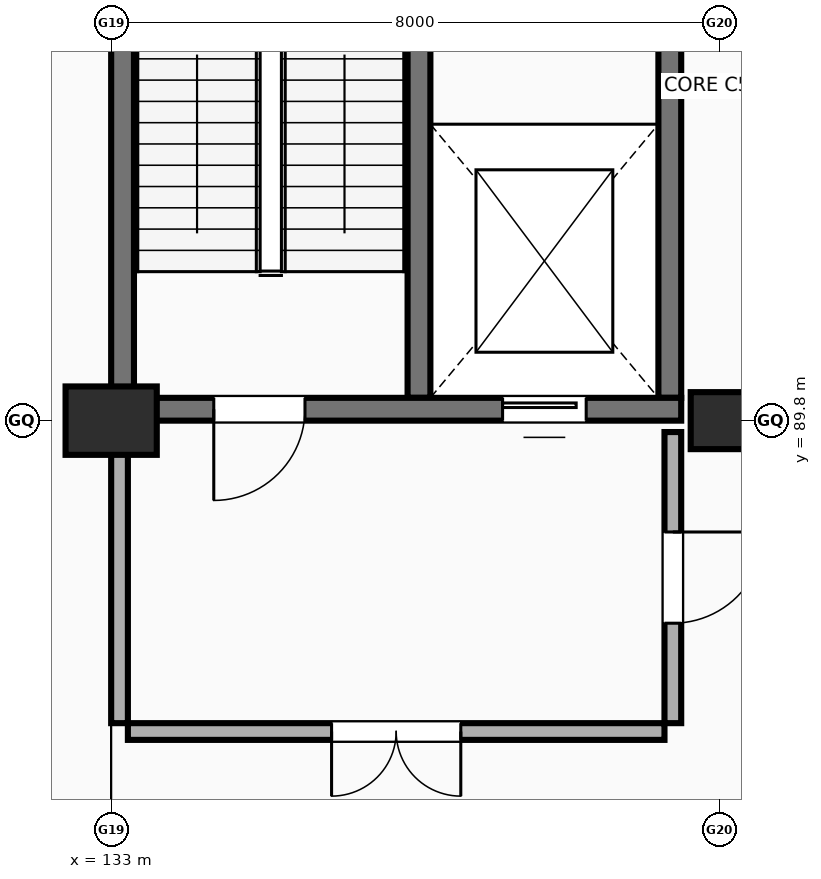
"""IFC4 building model, lengths in metres.
Left out: names, types, materials, properties, quantities, classifications, styles, units other than length and angle.
Written with IfcOpenShell. Run it as: python <this file> out.ifc"""

import sys

from ifc_helpers import new_model, si_unit, direction, frame, frame_2d, origin, origin_2d, place, context, subcontext, project, spatial, rectangle, extrude, element, fill, save


model = new_model("IFC4")
c1 = context("Model", 3, precision=1e-05, world=origin(), true_north=direction((0.0, 1.0)))
c2 = subcontext(c1, "Body", "Model", "MODEL_VIEW")
j1 = project(units=[si_unit("LENGTHUNIT", "METRE"), si_unit("PLANEANGLEUNIT", "RADIAN")], contexts=[c1])
p1 = place(None, origin())
s1 = spatial("IfcSite", under=j1, at=p1, CompositionType="ELEMENT")
p2 = place(p1, origin())
s2 = spatial("IfcBuilding", under=s1, at=p2, CompositionType="ELEMENT")
p3 = place(p2, frame((0.0, 0.0, 5.4)))
s3 = spatial("IfcBuildingStorey", under=s2, at=p3, CompositionType="ELEMENT", Elevation=5.4)
p4 = place(p3, frame((133.0, 89.8, 0.0), z_axis=(0.0, 0.0, 1.0), x_axis=(1.0, 0.0, 0.0)))
e1 = element("IfcColumn", 1, at=p4, inside=s3, PredefinedType="COLUMN", context=c2, shape_type="SweptSolid", body=[
    extrude(rectangle(XDim=1.2, YDim=0.9, at=origin_2d()), origin(), (0.0, 0.0, 1.0), 4.4),
])
p5 = place(p3, frame((141.0, 89.8, 0.0), z_axis=(0.0, 0.0, 1.0), x_axis=(1.0, 0.0, 0.0)))
e2 = element("IfcColumn", 2, at=p5, inside=s3, PredefinedType="COLUMN", context=c2, shape_type="SweptSolid", body=[
    extrude(rectangle(XDim=0.75, YDim=0.75, at=origin_2d()), origin(), (0.0, 0.0, 1.0), 4.4),
])
for number, where, z_axis, x_axis in (
    (3, (133.15, 90.1, 0.0), (0.0, 0.0, 1.0), (0.0, 1.0, 0.0)),
    (4, (140.35, 90.1, 0.0), (0.0, 0.0, 1.0), (0.0, 1.0, 0.0)),
    (5, (137.05, 90.1, 0.0), (0.0, 0.0, 1.0), (0.0, 1.0, 0.0)),
):
    element("IfcWall", number, at=place(p3, frame(where, z_axis=z_axis, x_axis=x_axis)), inside=s3, PredefinedType="SHEAR", context=c2, shape_type="SweptSolid", body=[
        extrude(rectangle(XDim=8.2, YDim=0.3, at=frame_2d((4.1, 0.0))), origin(), (0.0, 0.0, 1.0), 4.4),
    ])
p6 = place(p3, frame((133.0, 89.95, 0.0), z_axis=(0.0, 0.0, 1.0), x_axis=(1.0, 0.0, 0.0)))
e6 = element("IfcWall", 6, at=p6, inside=s3, PredefinedType="SHEAR", context=c2, shape_type="SweptSolid", body=[
    extrude(rectangle(XDim=7.5, YDim=0.3, at=frame_2d((3.75, 0.0))), origin(), (0.0, 0.0, 1.0), 4.4),
])
p7 = place(p6, frame((2.55, 0.0, 0.0), z_axis=(0.0, 0.0, 1.0), x_axis=(-1.0, 0.0, 0.0)))
e7 = element("IfcOpeningElement", 7, at=p7, cuts=e6, PredefinedType="OPENING", context=c2, shape_type="SweptSolid", body=[
    extrude(rectangle(XDim=1.2, YDim=2.15, at=frame_2d((0.6, 1.075))), frame((0.0, 0.16, 0.0), z_axis=(0.0, -1.0, 0.0), x_axis=(1.0, 0.0, 0.0)), (0.0, 0.0, 1.0), 0.32),
])
p8 = place(p6, frame((5.15, 0.0, 0.0)))
e8 = element("IfcOpeningElement", 8, at=p8, cuts=e6, PredefinedType="OPENING", context=c2, shape_type="SweptSolid", body=[
    extrude(rectangle(XDim=1.1, YDim=2.15, at=frame_2d((0.55, 1.075))), frame((0.0, 0.16, 0.0), z_axis=(0.0, -1.0, 0.0), x_axis=(1.0, 0.0, 0.0)), (0.0, 0.0, 1.0), 0.32),
])
p9 = place(p3, frame((133.22, 85.71, 0.0), z_axis=(0.0, 0.0, 1.0), x_axis=(1.0, 0.0, 0.0)))
e9 = element("IfcWall", 9, at=p9, inside=s3, PredefinedType="SOLIDWALL", context=c2, shape_type="SweptSolid", body=[
    extrude(rectangle(XDim=7.06, YDim=0.22, at=frame_2d((3.53, 0.0))), origin(), (0.0, 0.0, 1.0), 3.22),
])
p10 = place(p9, frame((4.38, 0.0, 0.0), z_axis=(0.0, 0.0, 1.0), x_axis=(-1.0, 0.0, 0.0)))
e10 = element("IfcOpeningElement", 10, at=p10, cuts=e9, PredefinedType="OPENING", context=c2, shape_type="SweptSolid", body=[
    extrude(rectangle(XDim=1.7, YDim=2.18, at=frame_2d((0.85, 1.09))), frame((0.0, 0.12, 0.0), z_axis=(0.0, -1.0, 0.0), x_axis=(1.0, 0.0, 0.0)), (0.0, 0.0, 1.0), 0.24),
])
p11 = place(p3, frame((133.11, 85.82, 0.0), z_axis=(0.0, 0.0, 1.0), x_axis=(0.0, 1.0, 0.0)))
e11 = element("IfcWall", 11, at=p11, inside=s3, PredefinedType="SOLIDWALL", context=c2, shape_type="SweptSolid", body=[
    extrude(rectangle(XDim=3.83, YDim=0.22, at=frame_2d((1.915, 0.0))), origin(), (0.0, 0.0, 1.0), 3.22),
])
p12 = place(p3, frame((140.39, 85.82, 0.0), z_axis=(0.0, 0.0, 1.0), x_axis=(0.0, 1.0, 0.0)))
e12 = element("IfcWall", 12, at=p12, inside=s3, PredefinedType="SOLIDWALL", context=c2, shape_type="SweptSolid", body=[
    extrude(rectangle(XDim=3.83, YDim=0.22, at=frame_2d((1.915, 0.0))), origin(), (0.0, 0.0, 1.0), 3.22),
])
p13 = place(p12, frame((2.515, 0.0, 0.0), z_axis=(0.0, 0.0, 1.0), x_axis=(-1.0, 0.0, 0.0)))
e13 = element("IfcOpeningElement", 13, at=p13, cuts=e12, PredefinedType="OPENING", context=c2, shape_type="SweptSolid", body=[
    extrude(rectangle(XDim=1.2, YDim=2.15, at=frame_2d((0.6, 1.075))), frame((0.0, 0.12, 0.0), z_axis=(0.0, -1.0, 0.0), x_axis=(1.0, 0.0, 0.0)), (0.0, 0.0, 1.0), 0.24),
])
p14 = place(p7, origin())
e14 = element("IfcDoor", 14, at=p14, inside=s3, OperationType="SINGLE_SWING_RIGHT", PredefinedType="DOOR", context=c2, shape_type="SweptSolid", body=[
    extrude(rectangle(XDim=1.2, YDim=2.15, at=frame_2d((0.6, 1.075))), frame((0.0, 0.025, 0.0), z_axis=(0.0, -1.0, 0.0), x_axis=(1.0, 0.0, 0.0)), (0.0, 0.0, 1.0), 0.05),
])
fill(e7, e14)
p15 = place(p8, origin())
e15 = element("IfcDoor", 15, at=p15, inside=s3, OperationType="SLIDING_TO_LEFT", PredefinedType="DOOR", context=c2, shape_type="SweptSolid", body=[
    extrude(rectangle(XDim=1.1, YDim=2.15, at=frame_2d((0.55, 1.075))), frame((0.0, 0.025, 0.0), z_axis=(0.0, -1.0, 0.0), x_axis=(1.0, 0.0, 0.0)), (0.0, 0.0, 1.0), 0.05),
])
fill(e8, e15)
p16 = place(p10, origin())
e16 = element("IfcDoor", 16, at=p16, inside=s3, OperationType="DOUBLE_DOOR_SINGLE_SWING", PredefinedType="DOOR", context=c2, shape_type="SweptSolid", body=[
    extrude(rectangle(XDim=1.7, YDim=2.18, at=frame_2d((0.85, 1.09))), frame((0.0, 0.025, 0.0), z_axis=(0.0, -1.0, 0.0), x_axis=(1.0, 0.0, 0.0)), (0.0, 0.0, 1.0), 0.05),
])
fill(e10, e16)
p17 = place(p13, origin())
e17 = element("IfcDoor", 17, at=p17, inside=s3, OperationType="SINGLE_SWING_LEFT", PredefinedType="DOOR", context=c2, shape_type="SweptSolid", body=[
    extrude(rectangle(XDim=1.2, YDim=2.15, at=frame_2d((0.6, 1.075))), frame((0.0, 0.025, 0.0), z_axis=(0.0, -1.0, 0.0), x_axis=(1.0, 0.0, 0.0)), (0.0, 0.0, 1.0), 0.05),
])
fill(e13, e17)
save(model, sys.argv[1])
